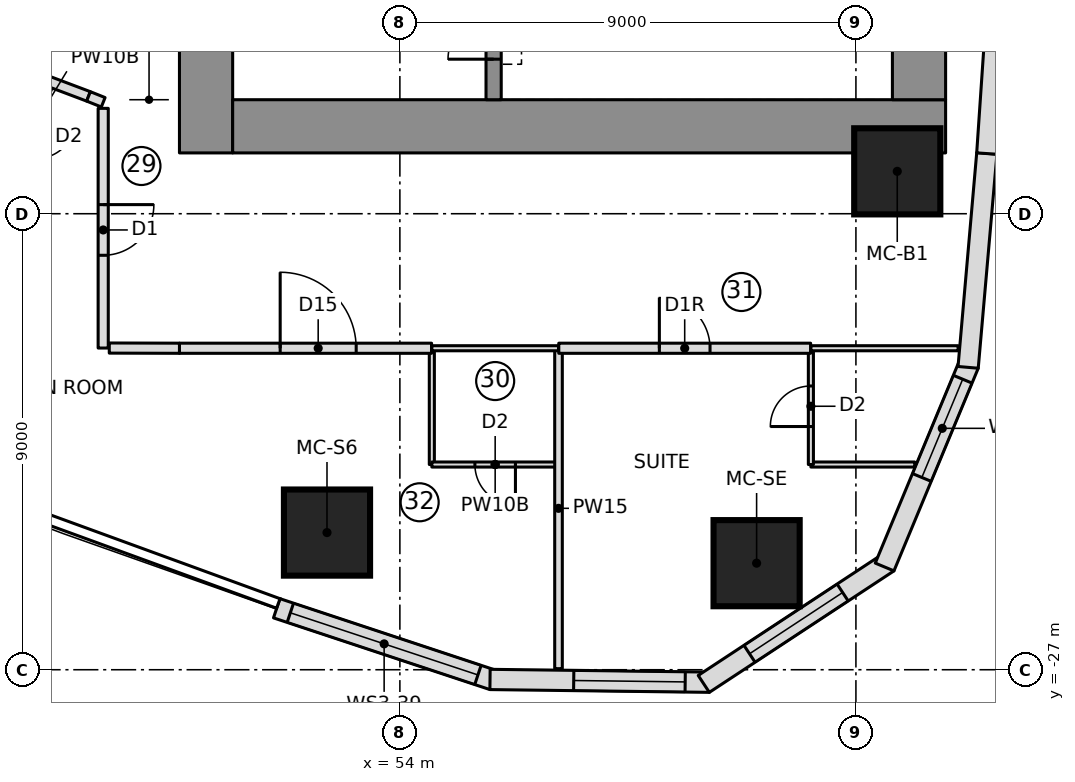
"""IFC4 building model, lengths in metres.
Left out: names, types, materials, properties, quantities, classifications, styles, units other than length and angle.
Written with IfcOpenShell. Run it as: python <this file> out.ifc"""

import sys

from ifc_helpers import new_model, si_unit, direction, frame, frame_2d, origin, origin_2d, place, context, subcontext, project, spatial, polyline, rectangle, outline, extrude, element, fill, save


model = new_model("IFC4")
c1 = context("Model", 3, precision=1e-05, world=origin(), true_north=direction((0.0, 1.0)))
c2 = subcontext(c1, "Body", "Model", "MODEL_VIEW")
j1 = project(units=[si_unit("LENGTHUNIT", "METRE"), si_unit("PLANEANGLEUNIT", "RADIAN")], contexts=[c1])
p1 = place(None, origin())
s1 = spatial("IfcSite", under=j1, at=p1, CompositionType="ELEMENT")
p2 = place(p1, origin())
s2 = spatial("IfcBuilding", under=s1, at=p2, CompositionType="ELEMENT")
p3 = place(p2, frame((0.0, 0.0, 102.65)))
s3 = spatial("IfcBuildingStorey", under=s2, at=p3, CompositionType="ELEMENT", Elevation=102.65)
p4 = place(p3, frame((50.175, -16.8, 0.0), z_axis=(0.0, 0.0, 1.0), x_axis=(0.0, 1.0, 0.0)))
e1 = element("IfcWall", 1, at=p4, inside=s3, PredefinedType="SHEAR", context=c2, shape_type="SweptSolid", body=[
    extrude(rectangle(XDim=10.15, YDim=1.05, at=frame_2d((5.075, 0.0))), origin(), (0.0, 0.0, 1.0), 3.55),
])
p5 = place(p4, frame((2.55, 0.0, 0.0)))
e2 = element("IfcOpeningElement", 2, at=p5, cuts=e1, PredefinedType="OPENING", context=c2, shape_type="SweptSolid", body=[
    extrude(rectangle(XDim=1.1, YDim=2.1, at=frame_2d((0.55, 1.05))), frame((0.0, 0.535, 0.0), z_axis=(0.0, -1.0, 0.0), x_axis=(1.0, 0.0, 0.0)), (0.0, 0.0, 1.0), 1.07),
])
p6 = place(p3, frame((50.7, -16.275, 0.0), z_axis=(0.0, 0.0, 1.0), x_axis=(1.0, 0.0, 0.0)))
e3 = element("IfcWall", 3, at=p6, inside=s3, PredefinedType="SHEAR", context=c2, shape_type="SweptSolid", body=[
    extrude(rectangle(XDim=14.07, YDim=1.05, at=frame_2d((7.035, 0.0))), origin(), (0.0, 0.0, 1.0), 3.55),
])
p7 = place(p3, frame((64.245, -15.75, 0.0), z_axis=(0.0, 0.0, 1.0), x_axis=(0.0, 1.0, 0.0)))
e4 = element("IfcWall", 4, at=p7, inside=s3, PredefinedType="SHEAR", context=c2, shape_type="SweptSolid", body=[
    extrude(rectangle(XDim=6.361, YDim=1.05, at=frame_2d((3.181, 0.0))), origin(), (0.0, 0.0, 1.0), 3.55),
])
p8 = place(p3, frame((55.85, -15.75, 0.0), z_axis=(0.0, 0.0, 1.0), x_axis=(0.0, 1.0, 0.0)))
e5 = element("IfcWall", 5, at=p8, inside=s3, PredefinedType="SHEAR", context=c2, shape_type="SweptSolid", body=[
    extrude(rectangle(XDim=5.4, YDim=0.3, at=frame_2d((2.7, 0.0))), origin(), (0.0, 0.0, 1.0), 3.55),
])
p9 = place(p8, frame((3.6, 0.0, 0.0)))
e6 = element("IfcOpeningElement", 6, at=p9, cuts=e5, PredefinedType="OPENING", context=c2, shape_type="SweptSolid", body=[
    extrude(rectangle(XDim=1.1, YDim=2.1, at=frame_2d((0.55, 1.05))), frame((0.0, 0.16, 0.0), z_axis=(0.0, -1.0, 0.0), x_axis=(1.0, 0.0, 0.0)), (0.0, 0.0, 1.0), 0.32),
])
p10 = place(p8, frame((0.8, 0.0, 0.0)))
e7 = element("IfcOpeningElement", 7, at=p10, cuts=e5, PredefinedType="OPENING", context=c2, shape_type="SweptSolid", body=[
    extrude(rectangle(XDim=0.9, YDim=2.1, at=frame_2d((0.45, 1.05))), frame((0.0, 0.16, 0.0), z_axis=(0.0, -1.0, 0.0), x_axis=(1.0, 0.0, 0.0)), (0.0, 0.0, 1.0), 0.32),
])
for number, where, z_axis, x_axis in (
    (8, (52.562, -24.293, 0.0), (0.0, 0.0, 1.0), (1.0, 0.0, 0.0)),
    (9, (61.04, -24.897, 0.0), (0.0, 0.0, 1.0), (1.0, 0.0, 0.0)),
    (10, (63.816, -17.164, 0.0), (0.0, 0.0, 1.0), (1.0, 0.0, 0.0)),
):
    element("IfcColumn", number, at=place(p3, frame(where, z_axis=z_axis, x_axis=x_axis)), inside=s3, PredefinedType="COLUMN", context=c2, shape_type="SweptSolid", body=[
        extrude(rectangle(XDim=1.7, YDim=1.7, at=origin_2d()), origin(), (0.0, 0.0, 1.0), 3.55),
    ])
p11 = place(p3, frame((51.569, -25.787, 0.0), z_axis=(0.0, 0.0, 1.0), x_axis=(0.94925004851, -0.314522408429, 0.0)))
e11 = element("IfcWall", 11, at=p11, inside=s3, PredefinedType="NOTDEFINED", context=c2, shape_type="SweptSolid", body=[
    extrude(outline(polyline([(0.0, -0.2), (4.499, -0.2), (4.437, 0.2), (0.0, 0.2), (0.0, -0.2)])), origin(), (0.0, 0.0, 1.0), 3.25),
])
p12 = place(p11, frame((0.284, 0.0, 0.9)))
e12 = element("IfcOpeningElement", 12, at=p12, cuts=e11, PredefinedType="OPENING", context=c2, shape_type="SweptSolid", body=[
    extrude(rectangle(XDim=3.9, YDim=1.8, at=frame_2d((1.95, 0.9))), frame((0.0, 0.21, 0.0), z_axis=(0.0, -1.0, 0.0), x_axis=(1.0, 0.0, 0.0)), (0.0, 0.0, 1.0), 0.42),
])
p13 = place(p3, frame((55.81, -27.192, 0.0), z_axis=(0.0, 0.0, 1.0), x_axis=(0.999919718849, -0.012671063772, 0.0)))
e13 = element("IfcWall", 13, at=p13, inside=s3, PredefinedType="NOTDEFINED", context=c2, shape_type="SweptSolid", body=[
    extrude(outline(polyline([(-0.031, -0.2), (4.3, -0.2), (4.177, 0.2), (0.031, 0.2), (-0.031, -0.2)])), origin(), (0.0, 0.0, 1.0), 3.25),
])
p14 = place(p13, frame((1.621, 0.0, 0.6)))
e14 = element("IfcOpeningElement", 14, at=p14, cuts=e13, PredefinedType="OPENING", context=c2, shape_type="SweptSolid", body=[
    extrude(outline(polyline([(0.0, 1.35), (0.084, 1.771), (0.322, 2.128), (0.679, 2.366), (1.1, 2.45), (1.521, 2.366), (1.878, 2.128), (2.116, 1.771), (2.2, 1.35), (2.2, 1.1), (2.116, 0.679), (1.878, 0.322), (1.521, 0.084), (1.1, 0.0), (0.679, 0.084), (0.322, 0.322), (0.084, 0.679), (0.0, 1.1), (0.0, 1.35)])), frame((0.0, 0.21, 0.0), z_axis=(0.0, -1.0, 0.0), x_axis=(1.0, 0.0, 0.0)), (0.0, 0.0, 1.0), 0.42),
])
p15 = place(p3, frame((60.049, -27.246, 0.0), z_axis=(0.0, 0.0, 1.0), x_axis=(0.835340523653, 0.549732852887, 0.0)))
e15 = element("IfcWall", 15, at=p15, inside=s3, PredefinedType="NOTDEFINED", context=c2, shape_type="SweptSolid", body=[
    extrude(outline(polyline([(-0.061, -0.2), (4.3, -0.2), (4.178, 0.2), (0.061, 0.2), (-0.061, -0.2)])), origin(), (0.0, 0.0, 1.0), 3.25),
])
p16 = place(p15, frame((1.02, 0.0, 0.6)))
e16 = element("IfcOpeningElement", 16, at=p16, cuts=e15, PredefinedType="OPENING", context=c2, shape_type="SweptSolid", body=[
    extrude(outline(polyline([(0.0, 1.35), (0.084, 1.771), (0.322, 2.128), (0.679, 2.366), (1.1, 2.45), (1.521, 2.366), (1.878, 2.128), (2.116, 1.771), (2.2, 1.35), (2.2, 1.1), (2.116, 0.679), (1.878, 0.322), (1.521, 0.084), (1.1, 0.0), (0.679, 0.084), (0.322, 0.322), (0.084, 0.679), (0.0, 1.1), (0.0, 1.35)])), frame((0.0, 0.21, 0.0), z_axis=(0.0, -1.0, 0.0), x_axis=(1.0, 0.0, 0.0)), (0.0, 0.0, 1.0), 0.42),
])
p17 = place(p3, frame((63.59, -24.916, 0.0), z_axis=(0.0, 0.0, 1.0), x_axis=(0.383997751971, 0.923334027577, 0.0)))
e17 = element("IfcWall", 17, at=p17, inside=s3, PredefinedType="NOTDEFINED", context=c2, shape_type="SweptSolid", body=[
    extrude(outline(polyline([(-0.061, -0.2), (4.27, -0.2), (4.208, 0.2), (0.061, 0.2), (-0.061, -0.2)])), origin(), (0.0, 0.0, 1.0), 3.25),
])
p18 = place(p17, frame((1.852, 0.0, 0.6)))
e18 = element("IfcOpeningElement", 18, at=p18, cuts=e17, PredefinedType="OPENING", context=c2, shape_type="SweptSolid", body=[
    extrude(outline(polyline([(0.0, 1.4), (0.08, 1.802), (0.308, 2.142), (0.648, 2.37), (1.05, 2.45), (1.452, 2.37), (1.792, 2.142), (2.02, 1.802), (2.1, 1.4), (2.1, 1.05), (2.02, 0.648), (1.792, 0.308), (1.452, 0.08), (1.05, 0.0), (0.648, 0.08), (0.308, 0.308), (0.08, 0.648), (0.0, 1.05), (0.0, 1.4)])), frame((0.0, 0.21, 0.0), z_axis=(0.0, -1.0, 0.0), x_axis=(1.0, 0.0, 0.0)), (0.0, 0.0, 1.0), 0.42),
])
p19 = place(p3, frame((65.217, -21.002, 0.0), z_axis=(0.0, 0.0, 1.0), x_axis=(0.086992730434, 0.996208946382, 0.0)))
e19 = element("IfcWall", 19, at=p19, inside=s3, PredefinedType="NOTDEFINED", context=c2, shape_type="SweptSolid", body=[
    extrude(outline(polyline([(-0.031, -0.2), (4.209, -0.2), (4.205, 0.2), (0.031, 0.2), (-0.031, -0.2)])), origin(), (0.0, 0.0, 1.0), 3.25),
])
p20 = place(p3, frame((65.583, -16.811, 0.0), z_axis=(0.0, 0.0, 1.0), x_axis=(0.067724559895, 0.997704056315, 0.0)))
e20 = element("IfcWall", 20, at=p20, inside=s3, PredefinedType="NOTDEFINED", context=c2, shape_type="SweptSolid", body=[
    extrude(outline(polyline([(-0.002, -0.2), (4.209, -0.2), (4.205, 0.2), (0.002, 0.2), (-0.002, -0.2)])), origin(), (0.0, 0.0, 1.0), 3.25),
])
p21 = place(p3, frame((54.631, -22.95, 0.0), z_axis=(0.0, 0.0, 1.0), x_axis=(0.0, 1.0, 0.0)))
e21 = element("IfcWall", 21, at=p21, inside=s3, PredefinedType="PARTITIONING", context=c2, shape_type="SweptSolid", body=[
    extrude(rectangle(XDim=2.3, YDim=0.1, at=frame_2d((1.15, 0.0))), origin(), (0.0, 0.0, 1.0), 3.25),
])
p22 = place(p3, frame((57.131, -22.95, 0.0), z_axis=(0.0, 0.0, 1.0), x_axis=(-1.0, 0.0, 0.0)))
e22 = element("IfcWall", 22, at=p22, inside=s3, PredefinedType="PARTITIONING", context=c2, shape_type="SweptSolid", body=[
    extrude(rectangle(XDim=2.5, YDim=0.1, at=frame_2d((1.25, 0.0))), origin(), (0.0, 0.0, 1.0), 3.25),
])
p23 = place(p22, frame((0.85, 0.0, 0.0)))
e23 = element("IfcOpeningElement", 23, at=p23, cuts=e22, PredefinedType="OPENING", context=c2, shape_type="SweptSolid", body=[
    extrude(rectangle(XDim=0.8, YDim=2.1, at=frame_2d((0.4, 1.05))), frame((0.0, 0.06, 0.0), z_axis=(0.0, -1.0, 0.0), x_axis=(1.0, 0.0, 0.0)), (0.0, 0.0, 1.0), 0.12),
])
p24 = place(p3, frame((64.16, -22.95, 0.0), z_axis=(0.0, 0.0, 1.0), x_axis=(-1.0, 0.0, 0.0)))
e24 = element("IfcWall", 24, at=p24, inside=s3, PredefinedType="PARTITIONING", context=c2, shape_type="SweptSolid", body=[
    extrude(rectangle(XDim=2.049, YDim=0.1, at=frame_2d((1.025, 0.0))), origin(), (0.0, 0.0, 1.0), 3.25),
])
p25 = place(p3, frame((62.111, -22.95, 0.0), z_axis=(0.0, 0.0, 1.0), x_axis=(0.0, 1.0, 0.0)))
e25 = element("IfcWall", 25, at=p25, inside=s3, PredefinedType="PARTITIONING", context=c2, shape_type="SweptSolid", body=[
    extrude(rectangle(XDim=2.3, YDim=0.1, at=frame_2d((1.15, 0.0))), origin(), (0.0, 0.0, 1.0), 3.25),
])
p26 = place(p25, frame((0.75, 0.0, 0.0)))
e26 = element("IfcOpeningElement", 26, at=p26, cuts=e25, PredefinedType="OPENING", context=c2, shape_type="SweptSolid", body=[
    extrude(rectangle(XDim=0.8, YDim=2.1, at=frame_2d((0.4, 1.05))), frame((0.0, 0.06, 0.0), z_axis=(0.0, -1.0, 0.0), x_axis=(1.0, 0.0, 0.0)), (0.0, 0.0, 1.0), 0.12),
])
p27 = place(p3, frame((57.131, -26.979, 0.0), z_axis=(0.0, 0.0, 1.0), x_axis=(0.0, 1.0, 0.0)))
e27 = element("IfcWall", 27, at=p27, inside=s3, PredefinedType="PARTITIONING", context=c2, shape_type="SweptSolid", body=[
    extrude(rectangle(XDim=6.329, YDim=0.15, at=frame_2d((3.165, 0.0))), origin(), (0.0, 0.0, 1.0), 3.25),
])
p28 = place(p3, frame((47.122, -15.434, 0.0), z_axis=(0.0, 0.0, 1.0), x_axis=(-0.417409478396, -0.90871850831, 0.0)))
e28 = element("IfcWall", 28, at=p28, inside=s3, PredefinedType="PARTITIONING", context=c2, shape_type="SweptSolid", body=[
    extrude(rectangle(XDim=2.283, YDim=0.1, at=frame_2d((1.142, 0.0))), origin(), (0.0, 0.0, 1.0), 3.25),
])
p29 = place(p28, frame((0.75, 0.0, 0.0)))
e29 = element("IfcOpeningElement", 29, at=p29, cuts=e28, PredefinedType="OPENING", context=c2, shape_type="SweptSolid", body=[
    extrude(rectangle(XDim=0.8, YDim=2.1, at=frame_2d((0.4, 1.05))), frame((0.0, 0.06, 0.0), z_axis=(0.0, -1.0, 0.0), x_axis=(1.0, 0.0, 0.0)), (0.0, 0.0, 1.0), 0.12),
])
p30 = place(p3, frame((49.65, -20.655, 0.0), z_axis=(0.0, 0.0, 1.0), x_axis=(1.0, 0.0, 0.0)))
e30 = element("IfcWall", 30, at=p30, inside=s3, PredefinedType="PARTITIONING", context=c2, shape_type="SweptSolid", body=[
    extrude(rectangle(XDim=4.976, YDim=0.2, at=frame_2d((2.488, 0.0))), origin(), (0.0, 0.0, 1.0), 3.25),
])
p31 = place(p30, frame((1.988, 0.0, 0.0)))
e31 = element("IfcOpeningElement", 31, at=p31, cuts=e30, PredefinedType="OPENING", context=c2, shape_type="SweptSolid", body=[
    extrude(rectangle(XDim=1.5, YDim=2.1, at=frame_2d((0.75, 1.05))), frame((0.0, 0.11, 0.0), z_axis=(0.0, -1.0, 0.0), x_axis=(1.0, 0.0, 0.0)), (0.0, 0.0, 1.0), 0.22),
])
p32 = place(p3, frame((57.135, -20.655, 0.0), z_axis=(0.0, 0.0, 1.0), x_axis=(1.0, 0.0, 0.0)))
e32 = element("IfcWall", 32, at=p32, inside=s3, PredefinedType="PARTITIONING", context=c2, shape_type="SweptSolid", body=[
    extrude(rectangle(XDim=4.971, YDim=0.2, at=frame_2d((2.485, 0.0))), origin(), (0.0, 0.0, 1.0), 3.25),
])
p33 = place(p32, frame((1.985, 0.0, 0.0)))
e33 = element("IfcOpeningElement", 33, at=p33, cuts=e32, PredefinedType="OPENING", context=c2, shape_type="SweptSolid", body=[
    extrude(rectangle(XDim=1.0, YDim=2.1, at=frame_2d((0.5, 1.05))), frame((0.0, 0.11, 0.0), z_axis=(0.0, -1.0, 0.0), x_axis=(1.0, 0.0, 0.0)), (0.0, 0.0, 1.0), 0.22),
])
p34 = place(p3, frame((54.631, -20.655, 0.0), z_axis=(0.0, 0.0, 1.0), x_axis=(1.0, 0.0, 0.0)))
e34 = element("IfcWall", 34, at=p34, inside=s3, PredefinedType="PARTITIONING", context=c2, shape_type="SweptSolid", body=[
    extrude(rectangle(XDim=2.5, YDim=0.1, at=frame_2d((1.25, 0.0))), origin(), (0.0, 0.0, 1.0), 3.25),
])
p35 = place(p3, frame((62.111, -20.655, 0.0), z_axis=(0.0, 0.0, 1.0), x_axis=(1.0, 0.0, 0.0)))
e35 = element("IfcWall", 35, at=p35, inside=s3, PredefinedType="PARTITIONING", context=c2, shape_type="SweptSolid", body=[
    extrude(rectangle(XDim=2.906, YDim=0.1, at=frame_2d((1.453, 0.0))), origin(), (0.0, 0.0, 1.0), 3.25),
])
p36 = place(p3, frame((45.069, -14.634, 0.0), z_axis=(0.0, 0.0, 1.0), x_axis=(0.93564003724, -0.352955692282, 0.0)))
e36 = element("IfcWall", 36, at=p36, inside=s3, PredefinedType="PARTITIONING", context=c2, shape_type="SweptSolid", body=[
    extrude(rectangle(XDim=2.978, YDim=0.2, at=frame_2d((1.489, 0.0))), origin(), (0.0, 0.0, 1.0), 3.25),
])
p37 = place(p3, frame((47.855, -15.685, 0.0), z_axis=(0.0, 0.0, 1.0), x_axis=(0.928638194287, -0.370986662983, 0.0)))
e37 = element("IfcWall", 37, at=p37, inside=s3, PredefinedType="PARTITIONING", context=c2, shape_type="SweptSolid", body=[
    extrude(rectangle(XDim=0.312, YDim=0.2, at=frame_2d((0.156, 0.0))), origin(), (0.0, 0.0, 1.0), 3.25),
])
p38 = place(p3, frame((48.145, -15.92, 0.0), z_axis=(0.0, 0.0, 1.0), x_axis=(-5.1610239e-05, -0.999999998668, 0.0)))
e38 = element("IfcWall", 38, at=p38, inside=s3, PredefinedType="PARTITIONING", context=c2, shape_type="SweptSolid", body=[
    extrude(rectangle(XDim=4.73, YDim=0.2, at=frame_2d((2.365, 0.0))), origin(), (0.0, 0.0, 1.0), 3.25),
])
p39 = place(p38, frame((1.9, 0.0, 0.0)))
e39 = element("IfcOpeningElement", 39, at=p39, cuts=e38, PredefinedType="OPENING", context=c2, shape_type="SweptSolid", body=[
    extrude(rectangle(XDim=1.0, YDim=2.1, at=frame_2d((0.5, 1.05))), frame((0.0, 0.11, 0.0), z_axis=(0.0, -1.0, 0.0), x_axis=(1.0, 0.0, 0.0)), (0.0, 0.0, 1.0), 0.22),
])
p40 = place(p3, frame((48.265, -20.651, 0.0), z_axis=(0.0, 0.0, 1.0), x_axis=(0.999996503144, -0.002644560569, 0.0)))
e40 = element("IfcWall", 40, at=p40, inside=s3, PredefinedType="PARTITIONING", context=c2, shape_type="SweptSolid", body=[
    extrude(rectangle(XDim=1.385, YDim=0.2, at=frame_2d((0.692, 0.0))), origin(), (0.0, 0.0, 1.0), 3.25),
])
p41 = place(p12, origin())
e41 = element("IfcWindow", 41, at=p41, inside=s3, PartitioningType="SINGLE_PANEL", PredefinedType="WINDOW", context=c2, shape_type="SweptSolid", body=[
    extrude(rectangle(XDim=3.9, YDim=1.8, at=frame_2d((1.95, 0.9))), frame((0.0, 0.17, 0.0), z_axis=(0.0, -1.0, 0.0), x_axis=(1.0, 0.0, 0.0)), (0.0, 0.0, 1.0), 0.06),
])
fill(e12, e41)
p42 = place(p14, origin())
e42 = element("IfcWindow", 42, at=p42, inside=s3, PartitioningType="SINGLE_PANEL", PredefinedType="WINDOW", context=c2, shape_type="SweptSolid", body=[
    extrude(outline(polyline([(0.0, 1.35), (0.084, 1.771), (0.322, 2.128), (0.679, 2.366), (1.1, 2.45), (1.521, 2.366), (1.878, 2.128), (2.116, 1.771), (2.2, 1.35), (2.2, 1.1), (2.116, 0.679), (1.878, 0.322), (1.521, 0.084), (1.1, 0.0), (0.679, 0.084), (0.322, 0.322), (0.084, 0.679), (0.0, 1.1), (0.0, 1.35)])), frame((0.0, 0.17, 0.0), z_axis=(0.0, -1.0, 0.0), x_axis=(1.0, 0.0, 0.0)), (0.0, 0.0, 1.0), 0.06),
])
fill(e14, e42)
p43 = place(p16, origin())
e43 = element("IfcWindow", 43, at=p43, inside=s3, PartitioningType="SINGLE_PANEL", PredefinedType="WINDOW", context=c2, shape_type="SweptSolid", body=[
    extrude(outline(polyline([(0.0, 1.35), (0.084, 1.771), (0.322, 2.128), (0.679, 2.366), (1.1, 2.45), (1.521, 2.366), (1.878, 2.128), (2.116, 1.771), (2.2, 1.35), (2.2, 1.1), (2.116, 0.679), (1.878, 0.322), (1.521, 0.084), (1.1, 0.0), (0.679, 0.084), (0.322, 0.322), (0.084, 0.679), (0.0, 1.1), (0.0, 1.35)])), frame((0.0, 0.17, 0.0), z_axis=(0.0, -1.0, 0.0), x_axis=(1.0, 0.0, 0.0)), (0.0, 0.0, 1.0), 0.06),
])
fill(e16, e43)
p44 = place(p18, origin())
e44 = element("IfcWindow", 44, at=p44, inside=s3, PartitioningType="SINGLE_PANEL", PredefinedType="WINDOW", context=c2, shape_type="SweptSolid", body=[
    extrude(outline(polyline([(0.0, 1.4), (0.08, 1.802), (0.308, 2.142), (0.648, 2.37), (1.05, 2.45), (1.452, 2.37), (1.792, 2.142), (2.02, 1.802), (2.1, 1.4), (2.1, 1.05), (2.02, 0.648), (1.792, 0.308), (1.452, 0.08), (1.05, 0.0), (0.648, 0.08), (0.308, 0.308), (0.08, 0.648), (0.0, 1.05), (0.0, 1.4)])), frame((0.0, 0.17, 0.0), z_axis=(0.0, -1.0, 0.0), x_axis=(1.0, 0.0, 0.0)), (0.0, 0.0, 1.0), 0.06),
])
fill(e18, e44)
p45 = place(p23, origin())
e45 = element("IfcDoor", 45, at=p45, inside=s3, OperationType="SINGLE_SWING_LEFT", PredefinedType="DOOR", context=c2, shape_type="SweptSolid", body=[
    extrude(rectangle(XDim=0.8, YDim=2.1, at=frame_2d((0.4, 1.05))), frame((0.0, 0.025, 0.0), z_axis=(0.0, -1.0, 0.0), x_axis=(1.0, 0.0, 0.0)), (0.0, 0.0, 1.0), 0.05),
])
fill(e23, e45)
p46 = place(p26, origin())
e46 = element("IfcDoor", 46, at=p46, inside=s3, OperationType="SINGLE_SWING_LEFT", PredefinedType="DOOR", context=c2, shape_type="SweptSolid", body=[
    extrude(rectangle(XDim=0.8, YDim=2.1, at=frame_2d((0.4, 1.05))), frame((0.0, 0.025, 0.0), z_axis=(0.0, -1.0, 0.0), x_axis=(1.0, 0.0, 0.0)), (0.0, 0.0, 1.0), 0.05),
])
fill(e26, e46)
p47 = place(p31, origin())
e47 = element("IfcDoor", 47, at=p47, inside=s3, OperationType="DOUBLE_DOOR_SINGLE_SWING", PredefinedType="DOOR", context=c2, shape_type="SweptSolid", body=[
    extrude(rectangle(XDim=1.5, YDim=2.1, at=frame_2d((0.75, 1.05))), frame((0.0, 0.025, 0.0), z_axis=(0.0, -1.0, 0.0), x_axis=(1.0, 0.0, 0.0)), (0.0, 0.0, 1.0), 0.05),
])
fill(e31, e47)
p48 = place(p33, origin())
e48 = element("IfcDoor", 48, at=p48, inside=s3, OperationType="SINGLE_SWING_RIGHT", PredefinedType="DOOR", context=c2, shape_type="SweptSolid", body=[
    extrude(rectangle(XDim=1.0, YDim=2.1, at=frame_2d((0.5, 1.05))), frame((0.0, 0.025, 0.0), z_axis=(0.0, -1.0, 0.0), x_axis=(1.0, 0.0, 0.0)), (0.0, 0.0, 1.0), 0.05),
])
fill(e33, e48)
p49 = place(p39, origin())
e49 = element("IfcDoor", 49, at=p49, inside=s3, OperationType="SINGLE_SWING_LEFT", PredefinedType="DOOR", context=c2, shape_type="SweptSolid", body=[
    extrude(rectangle(XDim=1.0, YDim=2.1, at=frame_2d((0.5, 1.05))), frame((0.0, 0.025, 0.0), z_axis=(0.0, -1.0, 0.0), x_axis=(1.0, 0.0, 0.0)), (0.0, 0.0, 1.0), 0.05),
])
fill(e39, e49)
p50 = place(p10, origin())
e50 = element("IfcDoor", 50, at=p50, inside=s3, OperationType="SINGLE_SWING_LEFT", PredefinedType="DOOR", context=c2, shape_type="SweptSolid", body=[
    extrude(rectangle(XDim=0.9, YDim=2.1, at=frame_2d((0.45, 1.05))), frame((0.0, 0.025, 0.0), z_axis=(0.0, -1.0, 0.0), x_axis=(1.0, 0.0, 0.0)), (0.0, 0.0, 1.0), 0.05),
])
fill(e7, e50)
save(model, sys.argv[1])
